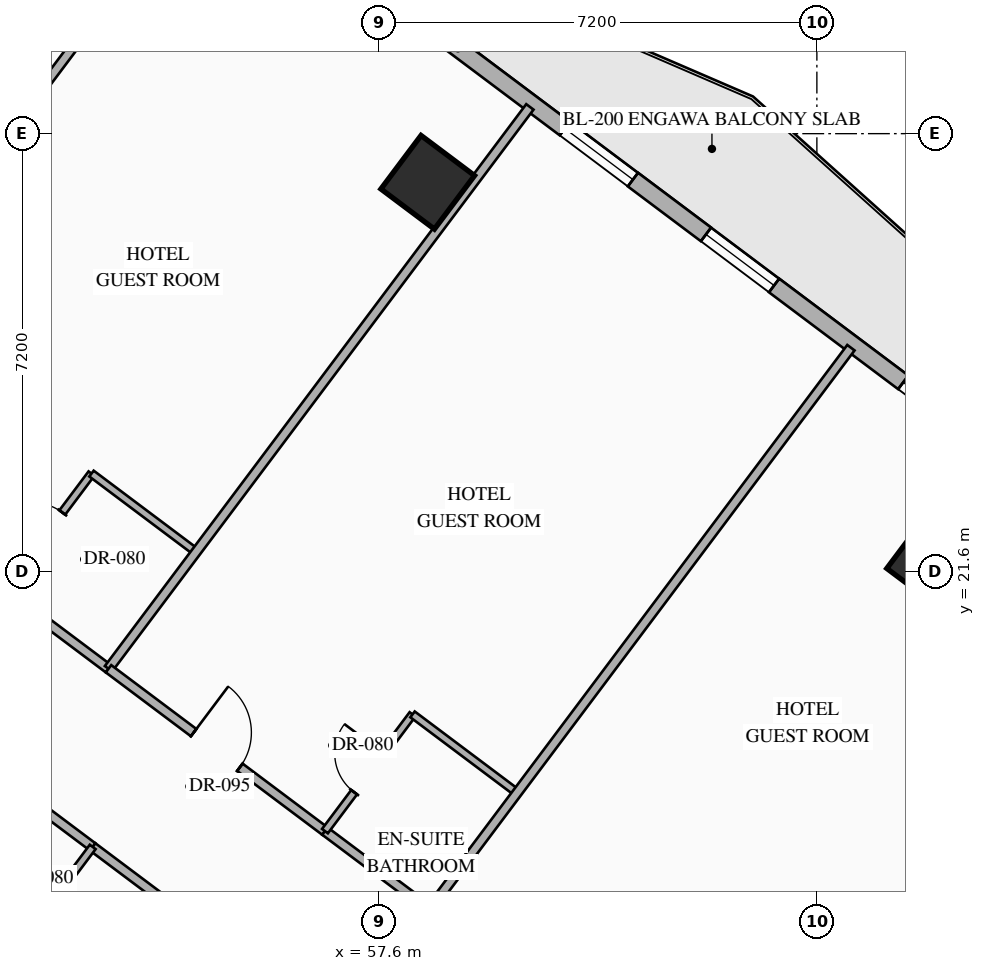
"""IFC4 building model, lengths in metres.
Left out: names, types, materials, properties, quantities, classifications, styles, units other than length and angle.
Written with IfcOpenShell. Run it as: python <this file> out.ifc"""

import sys

from ifc_helpers import new_model, si_unit, direction, frame, frame_2d, origin, origin_2d, place, context, subcontext, project, spatial, rectangle, hollow_rectangle, extrude, element, fill, save


model = new_model("IFC4")
c1 = context("Model", 3, precision=1e-05, world=origin(), true_north=direction((0.0, 1.0)))
c2 = subcontext(c1, "Body", "Model", "MODEL_VIEW")
j1 = project(units=[si_unit("LENGTHUNIT", "METRE"), si_unit("PLANEANGLEUNIT", "RADIAN")], contexts=[c1])
p1 = place(None, origin())
s1 = spatial("IfcSite", under=j1, at=p1, CompositionType="ELEMENT")
p2 = place(p1, origin())
s2 = spatial("IfcBuilding", under=s1, at=p2, CompositionType="ELEMENT")
p3 = place(p2, frame((0.0, 0.0, 39.95)))
s3 = spatial("IfcBuildingStorey", under=s2, at=p3, CompositionType="ELEMENT", Elevation=39.95)
for number, where, z_axis, x_axis in (
    (1, (58.4, 28.0, 0.0), (0.0, 0.0, 1.0), (0.8, -0.6, 0.0)),
    (2, (66.72, 21.76, 0.0), (0.0, 0.0, 1.0), (0.8, -0.6, 0.0)),
):
    element("IfcColumn", number, at=place(p3, frame(where, z_axis=z_axis, x_axis=x_axis)), inside=s3, PredefinedType="COLUMN", context=c2, shape_type="SweptSolid", body=[
        extrude(hollow_rectangle(XDim=1.1, YDim=1.1, WallThickness=0.04, at=origin_2d()), origin(), (0.0, 0.0, 1.0), 3.35),
    ])
p4 = place(p3, frame((44.86, 40.73, 0.0), z_axis=(0.0, 0.0, 1.0), x_axis=(0.800006902154, -0.599990797017, 0.0)))
e3 = element("IfcWall", 3, at=p4, inside=s3, PredefinedType="STANDARD", context=c2, shape_type="SweptSolid", body=[
    extrude(rectangle(XDim=29.712, YDim=0.28, at=frame_2d((14.856, 0.0))), origin(), (0.0, 0.0, 1.0), 3.13),
])
p5 = place(p4, frame((14.249, 0.0, 0.0)))
e4 = element("IfcOpeningElement", 4, at=p5, cuts=e3, PredefinedType="OPENING", context=c2, shape_type="SweptSolid", body=[
    extrude(rectangle(XDim=1.1, YDim=2.2, at=frame_2d((0.55, 1.1))), frame((0.0, 0.15, 0.0), z_axis=(0.0, -1.0, 0.0), x_axis=(1.0, 0.0, 0.0)), (0.0, 0.0, 1.0), 0.3),
])
p6 = place(p4, frame((1.612, 0.0, 0.85)))
e5 = element("IfcOpeningElement", 5, at=p6, cuts=e3, PredefinedType="OPENING", context=c2, shape_type="SweptSolid", body=[
    extrude(rectangle(XDim=1.4, YDim=1.8, at=frame_2d((0.7, 0.9))), frame((0.0, 0.15, 0.0), z_axis=(0.0, -1.0, 0.0), x_axis=(1.0, 0.0, 0.0)), (0.0, 0.0, 1.0), 0.3),
])
p7 = place(p4, frame((5.667, 0.0, 0.85)))
e6 = element("IfcOpeningElement", 6, at=p7, cuts=e3, PredefinedType="OPENING", context=c2, shape_type="SweptSolid", body=[
    extrude(rectangle(XDim=1.4, YDim=1.8, at=frame_2d((0.7, 0.9))), frame((0.0, 0.15, 0.0), z_axis=(0.0, -1.0, 0.0), x_axis=(1.0, 0.0, 0.0)), (0.0, 0.0, 1.0), 0.3),
])
p8 = place(p4, frame((9.912, 0.0, 0.85)))
e7 = element("IfcOpeningElement", 7, at=p8, cuts=e3, PredefinedType="OPENING", context=c2, shape_type="SweptSolid", body=[
    extrude(rectangle(XDim=1.4, YDim=1.8, at=frame_2d((0.7, 0.9))), frame((0.0, 0.15, 0.0), z_axis=(0.0, -1.0, 0.0), x_axis=(1.0, 0.0, 0.0)), (0.0, 0.0, 1.0), 0.3),
])
p9 = place(p4, frame((19.743, 0.0, 0.85)))
e8 = element("IfcOpeningElement", 8, at=p9, cuts=e3, PredefinedType="OPENING", context=c2, shape_type="SweptSolid", body=[
    extrude(rectangle(XDim=1.4, YDim=1.8, at=frame_2d((0.7, 0.9))), frame((0.0, 0.15, 0.0), z_axis=(0.0, -1.0, 0.0), x_axis=(1.0, 0.0, 0.0)), (0.0, 0.0, 1.0), 0.3),
])
p10 = place(p4, frame((22.645, 0.0, 0.85)))
e9 = element("IfcOpeningElement", 9, at=p10, cuts=e3, PredefinedType="OPENING", context=c2, shape_type="SweptSolid", body=[
    extrude(rectangle(XDim=1.4, YDim=1.8, at=frame_2d((0.7, 0.9))), frame((0.0, 0.15, 0.0), z_axis=(0.0, -1.0, 0.0), x_axis=(1.0, 0.0, 0.0)), (0.0, 0.0, 1.0), 0.3),
])
p11 = place(p4, frame((26.7, 0.0, 0.85)))
e10 = element("IfcOpeningElement", 10, at=p11, cuts=e3, PredefinedType="OPENING", context=c2, shape_type="SweptSolid", body=[
    extrude(rectangle(XDim=1.4, YDim=1.8, at=frame_2d((0.7, 0.9))), frame((0.0, 0.15, 0.0), z_axis=(0.0, -1.0, 0.0), x_axis=(1.0, 0.0, 0.0)), (0.0, 0.0, 1.0), 0.3),
])
p12 = place(p3, frame((53.318, 2.487, 0.0), z_axis=(0.0, 0.0, 1.0), x_axis=(-0.800004174678, 0.599994433723, 0.0)))
e11 = element("IfcWall", 11, at=p12, inside=s3, PredefinedType="STANDARD", context=c2, shape_type="SweptSolid", body=[
    extrude(rectangle(XDim=35.089, YDim=0.28, at=frame_2d((17.544, 0.0))), origin(), (0.0, 0.0, 1.0), 3.13),
])
p13 = place(p12, frame((1.931, 0.0, 0.85)))
e12 = element("IfcOpeningElement", 12, at=p13, cuts=e11, PredefinedType="OPENING", context=c2, shape_type="SweptSolid", body=[
    extrude(rectangle(XDim=1.4, YDim=1.8, at=frame_2d((0.7, 0.9))), frame((0.0, 0.15, 0.0), z_axis=(0.0, -1.0, 0.0), x_axis=(1.0, 0.0, 0.0)), (0.0, 0.0, 1.0), 0.3),
])
p14 = place(p12, frame((6.819, 0.0, 0.85)))
e13 = element("IfcOpeningElement", 13, at=p14, cuts=e11, PredefinedType="OPENING", context=c2, shape_type="SweptSolid", body=[
    extrude(rectangle(XDim=1.4, YDim=1.8, at=frame_2d((0.7, 0.9))), frame((0.0, 0.15, 0.0), z_axis=(0.0, -1.0, 0.0), x_axis=(1.0, 0.0, 0.0)), (0.0, 0.0, 1.0), 0.3),
])
p15 = place(p12, frame((11.832, 0.0, 0.85)))
e14 = element("IfcOpeningElement", 14, at=p15, cuts=e11, PredefinedType="OPENING", context=c2, shape_type="SweptSolid", body=[
    extrude(rectangle(XDim=1.4, YDim=1.8, at=frame_2d((0.7, 0.9))), frame((0.0, 0.15, 0.0), z_axis=(0.0, -1.0, 0.0), x_axis=(1.0, 0.0, 0.0)), (0.0, 0.0, 1.0), 0.3),
])
p16 = place(p12, frame((17.647, 0.0, 0.85)))
e15 = element("IfcOpeningElement", 15, at=p16, cuts=e11, PredefinedType="OPENING", context=c2, shape_type="SweptSolid", body=[
    extrude(rectangle(XDim=1.4, YDim=1.8, at=frame_2d((0.7, 0.9))), frame((0.0, 0.15, 0.0), z_axis=(0.0, -1.0, 0.0), x_axis=(1.0, 0.0, 0.0)), (0.0, 0.0, 1.0), 0.3),
])
p17 = place(p12, frame((21.857, 0.0, 0.85)))
e16 = element("IfcOpeningElement", 16, at=p17, cuts=e11, PredefinedType="OPENING", context=c2, shape_type="SweptSolid", body=[
    extrude(rectangle(XDim=1.4, YDim=1.8, at=frame_2d((0.7, 0.9))), frame((0.0, 0.15, 0.0), z_axis=(0.0, -1.0, 0.0), x_axis=(1.0, 0.0, 0.0)), (0.0, 0.0, 1.0), 0.3),
])
p18 = place(p12, frame((26.87, 0.0, 0.85)))
e17 = element("IfcOpeningElement", 17, at=p18, cuts=e11, PredefinedType="OPENING", context=c2, shape_type="SweptSolid", body=[
    extrude(rectangle(XDim=1.4, YDim=1.8, at=frame_2d((0.7, 0.9))), frame((0.0, 0.15, 0.0), z_axis=(0.0, -1.0, 0.0), x_axis=(1.0, 0.0, 0.0)), (0.0, 0.0, 1.0), 0.3),
])
p19 = place(p12, frame((31.757, 0.0, 0.85)))
e18 = element("IfcOpeningElement", 18, at=p19, cuts=e11, PredefinedType="OPENING", context=c2, shape_type="SweptSolid", body=[
    extrude(rectangle(XDim=1.4, YDim=1.8, at=frame_2d((0.7, 0.9))), frame((0.0, 0.15, 0.0), z_axis=(0.0, -1.0, 0.0), x_axis=(1.0, 0.0, 0.0)), (0.0, 0.0, 1.0), 0.3),
])
p20 = place(p3, frame((51.43, 21.29, 0.0), z_axis=(0.0, 0.0, 1.0), x_axis=(0.79998637334, -0.60001816845, 0.0)))
e19 = element("IfcWall", 19, at=p20, inside=s3, PredefinedType="PARTITIONING", context=c2, shape_type="SweptSolid", body=[
    extrude(rectangle(XDim=2.15, YDim=0.15, at=frame_2d((1.075, 0.0))), origin(), (0.0, 0.0, 1.0), 2.775),
])
p21 = place(p3, frame((51.43, 21.29, 0.0), z_axis=(0.0, 0.0, 1.0), x_axis=(0.600065100855, 0.79995117022, 0.0)))
e20 = element("IfcWall", 20, at=p21, inside=s3, PredefinedType="PARTITIONING", context=c2, shape_type="SweptSolid", body=[
    extrude(rectangle(XDim=2.4, YDim=0.12, at=frame_2d((1.2, 0.0))), origin(), (0.0, 0.0, 1.0), 3.13),
])
p22 = place(p21, frame((0.8, 0.0, 0.0)))
e21 = element("IfcOpeningElement", 21, at=p22, cuts=e20, PredefinedType="OPENING", context=c2, shape_type="SweptSolid", body=[
    extrude(rectangle(XDim=0.8, YDim=2.06, at=frame_2d((0.4, 1.03))), frame((0.0, 0.07, 0.0), z_axis=(0.0, -1.0, 0.0), x_axis=(1.0, 0.0, 0.0)), (0.0, 0.0, 1.0), 0.14),
])
p23 = place(p3, frame((52.87, 23.21, 0.0), z_axis=(0.0, 0.0, 1.0), x_axis=(0.79998637334, -0.60001816845, 0.0)))
e22 = element("IfcWall", 22, at=p23, inside=s3, PredefinedType="PARTITIONING", context=c2, shape_type="SweptSolid", body=[
    extrude(rectangle(XDim=2.15, YDim=0.12, at=frame_2d((1.075, 0.0))), origin(), (0.0, 0.0, 1.0), 3.13),
])
for number, where, z_axis, x_axis in (
    (23, (47.87, 23.96, 0.0), (0.0, 0.0, 1.0), (0.6, 0.8, 0.0)),
    (24, (53.15, 20.0, 0.0), (0.0, 0.0, 1.0), (0.6, 0.8, 0.0)),
):
    element("IfcWall", number, at=place(p3, frame(where, z_axis=z_axis, x_axis=x_axis)), inside=s3, PredefinedType="PARTITIONING", context=c2, shape_type="SweptSolid", body=[
        extrude(rectangle(XDim=11.55, YDim=0.15, at=frame_2d((5.775, 0.0))), origin(), (0.0, 0.0, 1.0), 3.13),
    ])
p24 = place(p3, frame((53.15, 20.0, 0.0), z_axis=(0.0, 0.0, 1.0), x_axis=(0.800013166942, -0.599982443676, 0.0)))
e25 = element("IfcWall", 25, at=p24, inside=s3, PredefinedType="PARTITIONING", context=c2, shape_type="SweptSolid", body=[
    extrude(rectangle(XDim=4.45, YDim=0.15, at=frame_2d((2.225, 0.0))), origin(), (0.0, 0.0, 1.0), 2.775),
])
p25 = place(p24, frame((1.75, 0.0, 0.0)))
e26 = element("IfcOpeningElement", 26, at=p25, cuts=e25, PredefinedType="OPENING", context=c2, shape_type="SweptSolid", body=[
    extrude(rectangle(XDim=0.95, YDim=2.15, at=frame_2d((0.475, 1.075))), frame((0.0, 0.085, 0.0), z_axis=(0.0, -1.0, 0.0), x_axis=(1.0, 0.0, 0.0)), (0.0, 0.0, 1.0), 0.17),
])
p26 = place(p3, frame((56.71, 17.33, 0.0), z_axis=(0.0, 0.0, 1.0), x_axis=(0.79998637334, -0.60001816845, 0.0)))
e27 = element("IfcWall", 27, at=p26, inside=s3, PredefinedType="PARTITIONING", context=c2, shape_type="SweptSolid", body=[
    extrude(rectangle(XDim=2.15, YDim=0.15, at=frame_2d((1.075, 0.0))), origin(), (0.0, 0.0, 1.0), 2.775),
])
p27 = place(p3, frame((56.71, 17.33, 0.0), z_axis=(0.0, 0.0, 1.0), x_axis=(0.6, 0.8, 0.0)))
e28 = element("IfcWall", 28, at=p27, inside=s3, PredefinedType="PARTITIONING", context=c2, shape_type="SweptSolid", body=[
    extrude(rectangle(XDim=2.4, YDim=0.12, at=frame_2d((1.2, 0.0))), origin(), (0.0, 0.0, 1.0), 3.13),
])
p28 = place(p27, frame((0.8, 0.0, 0.0)))
e29 = element("IfcOpeningElement", 29, at=p28, cuts=e28, PredefinedType="OPENING", context=c2, shape_type="SweptSolid", body=[
    extrude(rectangle(XDim=0.8, YDim=2.06, at=frame_2d((0.4, 1.03))), frame((0.0, 0.07, 0.0), z_axis=(0.0, -1.0, 0.0), x_axis=(1.0, 0.0, 0.0)), (0.0, 0.0, 1.0), 0.14),
])
p29 = place(p3, frame((58.15, 19.25, 0.0), z_axis=(0.0, 0.0, 1.0), x_axis=(0.800027249606, -0.599963665473, 0.0)))
e30 = element("IfcWall", 30, at=p29, inside=s3, PredefinedType="PARTITIONING", context=c2, shape_type="SweptSolid", body=[
    extrude(rectangle(XDim=2.15, YDim=0.12, at=frame_2d((1.075, 0.0))), origin(), (0.0, 0.0, 1.0), 3.13),
])
p30 = place(p3, frame((58.43, 16.04, 0.0), z_axis=(0.0, 0.0, 1.0), x_axis=(0.60001014597, 0.799992390422, 0.0)))
e31 = element("IfcWall", 31, at=p30, inside=s3, PredefinedType="PARTITIONING", context=c2, shape_type="SweptSolid", body=[
    extrude(rectangle(XDim=11.55, YDim=0.15, at=frame_2d((5.775, 0.0))), origin(), (0.0, 0.0, 1.0), 3.13),
])
p31 = place(p3, frame((51.17, 18.36, 0.0), z_axis=(0.0, 0.0, 1.0), x_axis=(0.79998637334, -0.60001816845, 0.0)))
e32 = element("IfcWall", 32, at=p31, inside=s3, PredefinedType="PARTITIONING", context=c2, shape_type="SweptSolid", body=[
    extrude(rectangle(XDim=2.15, YDim=0.15, at=frame_2d((1.075, 0.0))), origin(), (0.0, 0.0, 1.0), 2.425),
])
p32 = place(p3, frame((52.89, 17.07, 0.0), z_axis=(0.0, 0.0, 1.0), x_axis=(0.8, -0.6, 0.0)))
e33 = element("IfcWall", 33, at=p32, inside=s3, PredefinedType="PARTITIONING", context=c2, shape_type="SweptSolid", body=[
    extrude(rectangle(XDim=11.51, YDim=0.15, at=frame_2d((5.755, 0.0))), origin(), (0.0, 0.0, 1.0), 2.425),
])
p33 = place(p32, frame((5.28, 0.0, 0.0)))
e34 = element("IfcOpeningElement", 34, at=p33, cuts=e33, PredefinedType="OPENING", context=c2, shape_type="SweptSolid", body=[
    extrude(rectangle(XDim=0.95, YDim=2.15, at=frame_2d((0.475, 1.075))), frame((0.0, 0.085, 0.0), z_axis=(0.0, -1.0, 0.0), x_axis=(1.0, 0.0, 0.0)), (0.0, 0.0, 1.0), 0.17),
])
p34 = place(p3, frame((51.45, 15.15, 0.0), z_axis=(0.0, 0.0, 1.0), x_axis=(0.599951172744, 0.800036618114, 0.0)))
e35 = element("IfcWall", 35, at=p34, inside=s3, PredefinedType="PARTITIONING", context=c2, shape_type="SweptSolid", body=[
    extrude(rectangle(XDim=2.4, YDim=0.12, at=frame_2d((1.2, 0.0))), origin(), (0.0, 0.0, 1.0), 3.13),
])
p35 = place(p34, frame((0.8, 0.0, 0.0)))
e36 = element("IfcOpeningElement", 36, at=p35, cuts=e35, PredefinedType="OPENING", context=c2, shape_type="SweptSolid", body=[
    extrude(rectangle(XDim=0.8, YDim=2.06, at=frame_2d((0.4, 1.03))), frame((0.0, 0.07, 0.0), z_axis=(0.0, -1.0, 0.0), x_axis=(1.0, 0.0, 0.0)), (0.0, 0.0, 1.0), 0.14),
])
p36 = place(p9, origin())
e37 = element("IfcWindow", 37, at=p36, inside=s3, PartitioningType="SINGLE_PANEL", PredefinedType="WINDOW", context=c2, shape_type="SweptSolid", body=[
    extrude(rectangle(XDim=1.4, YDim=1.8, at=frame_2d((0.7, 0.9))), frame((0.0, 0.03, 0.0), z_axis=(0.0, -1.0, 0.0), x_axis=(1.0, 0.0, 0.0)), (0.0, 0.0, 1.0), 0.06),
])
fill(e8, e37)
p37 = place(p10, origin())
e38 = element("IfcWindow", 38, at=p37, inside=s3, PartitioningType="SINGLE_PANEL", PredefinedType="WINDOW", context=c2, shape_type="SweptSolid", body=[
    extrude(rectangle(XDim=1.4, YDim=1.8, at=frame_2d((0.7, 0.9))), frame((0.0, 0.03, 0.0), z_axis=(0.0, -1.0, 0.0), x_axis=(1.0, 0.0, 0.0)), (0.0, 0.0, 1.0), 0.06),
])
fill(e9, e38)
p38 = place(p11, origin())
e39 = element("IfcWindow", 39, at=p38, inside=s3, PartitioningType="SINGLE_PANEL", PredefinedType="WINDOW", context=c2, shape_type="SweptSolid", body=[
    extrude(rectangle(XDim=1.4, YDim=1.8, at=frame_2d((0.7, 0.9))), frame((0.0, 0.03, 0.0), z_axis=(0.0, -1.0, 0.0), x_axis=(1.0, 0.0, 0.0)), (0.0, 0.0, 1.0), 0.06),
])
fill(e10, e39)
p39 = place(p22, origin())
e40 = element("IfcDoor", 40, at=p39, inside=s3, OperationType="SINGLE_SWING_LEFT", PredefinedType="DOOR", context=c2, shape_type="SweptSolid", body=[
    extrude(rectangle(XDim=0.8, YDim=2.06, at=frame_2d((0.4, 1.03))), frame((0.0, 0.025, 0.0), z_axis=(0.0, -1.0, 0.0), x_axis=(1.0, 0.0, 0.0)), (0.0, 0.0, 1.0), 0.05),
])
fill(e21, e40)
p40 = place(p25, origin())
e41 = element("IfcDoor", 41, at=p40, inside=s3, OperationType="SINGLE_SWING_LEFT", PredefinedType="DOOR", context=c2, shape_type="SweptSolid", body=[
    extrude(rectangle(XDim=0.95, YDim=2.15, at=frame_2d((0.475, 1.075))), frame((0.0, 0.025, 0.0), z_axis=(0.0, -1.0, 0.0), x_axis=(1.0, 0.0, 0.0)), (0.0, 0.0, 1.0), 0.05),
])
fill(e26, e41)
p41 = place(p28, origin())
e42 = element("IfcDoor", 42, at=p41, inside=s3, OperationType="SINGLE_SWING_RIGHT", PredefinedType="DOOR", context=c2, shape_type="SweptSolid", body=[
    extrude(rectangle(XDim=0.8, YDim=2.06, at=frame_2d((0.4, 1.03))), frame((0.0, 0.025, 0.0), z_axis=(0.0, -1.0, 0.0), x_axis=(1.0, 0.0, 0.0)), (0.0, 0.0, 1.0), 0.05),
])
fill(e29, e42)
p42 = place(p35, origin())
e43 = element("IfcDoor", 43, at=p42, inside=s3, OperationType="SINGLE_SWING_RIGHT", PredefinedType="DOOR", context=c2, shape_type="SweptSolid", body=[
    extrude(rectangle(XDim=0.8, YDim=2.06, at=frame_2d((0.4, 1.03))), frame((0.0, 0.025, 0.0), z_axis=(0.0, -1.0, 0.0), x_axis=(1.0, 0.0, 0.0)), (0.0, 0.0, 1.0), 0.05),
])
fill(e36, e43)
save(model, sys.argv[1])
